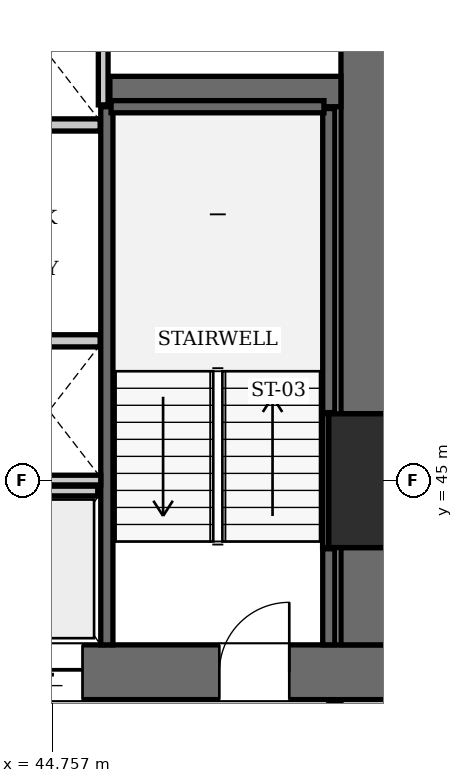
"""IFC4 building model, lengths in metres.
Left out: names, types, materials, properties, quantities, classifications, styles, units other than length and angle.
Written with IfcOpenShell. Run it as: python <this file> out.ifc"""

import sys

from ifc_helpers import new_model, si_unit, direction, frame, frame_2d, origin, origin_2d, place, context, subcontext, project, spatial, rectangle, extrude, element, fill, save


model = new_model("IFC4")
c1 = context("Model", 3, precision=1e-05, world=origin(), true_north=direction((0.0, 1.0)))
c2 = subcontext(c1, "Body", "Model", "MODEL_VIEW")
j1 = project(units=[si_unit("LENGTHUNIT", "METRE"), si_unit("PLANEANGLEUNIT", "RADIAN")], contexts=[c1])
p1 = place(None, origin())
s1 = spatial("IfcSite", under=j1, at=p1, CompositionType="ELEMENT")
p2 = place(p1, origin())
s2 = spatial("IfcBuilding", under=s1, at=p2, CompositionType="ELEMENT")
p3 = place(p2, frame((0.0, 0.0, 42.35)))
s3 = spatial("IfcBuildingStorey", under=s2, at=p3, CompositionType="ELEMENT", Elevation=42.35)
p4 = place(p3, frame((50.4, 45.0, 0.0), z_axis=(0.0, 0.0, 1.0), x_axis=(1.0, 0.0, 0.0)))
e1 = element("IfcColumn", 1, at=p4, inside=s3, PredefinedType="COLUMN", context=c2, shape_type="SweptSolid", body=[
    extrude(rectangle(XDim=2.2, YDim=2.2, at=origin_2d()), origin(), (0.0, 0.0, 1.0), 3.85),
])
p5 = place(p3, frame((43.6, 41.85, 0.0), z_axis=(0.0, 0.0, 1.0), x_axis=(1.0, 0.0, 0.0)))
e2 = element("IfcWall", 2, at=p5, inside=s3, PredefinedType="SHEAR", context=c2, shape_type="SweptSolid", body=[
    extrude(rectangle(XDim=6.8, YDim=0.9, at=frame_2d((3.4, 0.0))), origin(), (0.0, 0.0, 1.0), 3.85),
])
p6 = place(p5, frame((3.9, 0.0, 0.0)))
e3 = element("IfcOpeningElement", 3, at=p6, cuts=e2, PredefinedType="OPENING", context=c2, shape_type="SweptSolid", body=[
    extrude(rectangle(XDim=1.15, YDim=2.15, at=frame_2d((0.575, 1.075))), frame((0.0, 0.46, 0.0), z_axis=(0.0, -1.0, 0.0), x_axis=(1.0, 0.0, 0.0)), (0.0, 0.0, 1.0), 0.92),
])
p7 = place(p5, frame((0.55, 0.0, 0.0)))
e4 = element("IfcOpeningElement", 4, at=p7, cuts=e2, PredefinedType="OPENING", context=c2, shape_type="SweptSolid", body=[
    extrude(rectangle(XDim=1.1, YDim=2.2, at=frame_2d((0.55, 1.1))), frame((0.0, 0.46, 0.0), z_axis=(0.0, -1.0, 0.0), x_axis=(1.0, 0.0, 0.0)), (0.0, 0.0, 1.0), 0.92),
])
p8 = place(p3, frame((49.95, 42.3, 0.0), z_axis=(0.0, 0.0, 1.0), x_axis=(0.0, 1.0, 0.0)))
e5 = element("IfcWall", 5, at=p8, inside=s3, PredefinedType="SHEAR", context=c2, shape_type="SweptSolid", body=[
    extrude(rectangle(XDim=1.6, YDim=0.9, at=frame_2d((0.8, 0.0))), origin(), (0.0, 0.0, 1.0), 3.85),
])
p9 = place(p3, frame((49.95, 46.1, 0.0), z_axis=(0.0, 0.0, 1.0), x_axis=(0.0, 1.0, 0.0)))
e6 = element("IfcWall", 6, at=p9, inside=s3, PredefinedType="SHEAR", context=c2, shape_type="SweptSolid", body=[
    extrude(rectangle(XDim=7.0, YDim=0.9, at=frame_2d((3.5, 0.0))), origin(), (0.0, 0.0, 1.0), 3.85),
])
p10 = place(p3, frame((45.7, 51.4, 0.0), z_axis=(0.0, 0.0, 1.0), x_axis=(1.0, 0.0, 0.0)))
e7 = element("IfcWall", 7, at=p10, inside=s3, PredefinedType="SHEAR", context=c2, shape_type="SweptSolid", body=[
    extrude(rectangle(XDim=3.8, YDim=0.5, at=frame_2d((1.9, 0.0))), origin(), (0.0, 0.0, 1.0), 3.85),
])
p11 = place(p3, frame((45.65, 42.3, 0.0), z_axis=(0.0, 0.0, 1.0), x_axis=(0.0, 1.0, 0.0)))
e8 = element("IfcWall", 8, at=p11, inside=s3, PredefinedType="SOLIDWALL", context=c2, shape_type="SweptSolid", body=[
    extrude(rectangle(XDim=8.85, YDim=0.2, at=frame_2d((4.425, 0.0))), origin(), (0.0, 0.0, 1.0), 3.61),
])
p12 = place(p3, frame((49.3, 42.3, 0.0), z_axis=(0.0, 0.0, 1.0), x_axis=(0.0, 1.0, 0.0)))
e9 = element("IfcWall", 9, at=p12, inside=s3, PredefinedType="SOLIDWALL", context=c2, shape_type="SweptSolid", body=[
    extrude(rectangle(XDim=1.58, YDim=0.2, at=frame_2d((0.79, 0.0))), origin(), (0.0, 0.0, 1.0), 3.61),
])
p13 = place(p3, frame((49.3, 46.12, 0.0), z_axis=(0.0, 0.0, 1.0), x_axis=(0.0, 1.0, 0.0)))
e10 = element("IfcWall", 10, at=p13, inside=s3, PredefinedType="SOLIDWALL", context=c2, shape_type="SweptSolid", body=[
    extrude(rectangle(XDim=5.0, YDim=0.2, at=frame_2d((2.5, 0.0))), origin(), (0.0, 0.0, 1.0), 3.61),
])
p14 = place(p3, frame((45.72, 51.15, 0.0), z_axis=(0.0, 0.0, 1.0), x_axis=(1.0, 0.0, 0.0)))
e11 = element("IfcWall", 11, at=p14, inside=s3, PredefinedType="SOLIDWALL", context=c2, shape_type="SweptSolid", body=[
    extrude(rectangle(XDim=3.5, YDim=0.2, at=frame_2d((1.75, 0.0))), origin(), (0.0, 0.0, 1.0), 3.61),
])
p15 = place(p3, frame((49.248, 43.9, 0.0), z_axis=(0.0, 0.0, 1.0), x_axis=(0.0, 1.0, 0.0)))
e12 = element("IfcWall", 12, at=p15, inside=s3, PredefinedType="SOLIDWALL", context=c2, shape_type="SweptSolid", body=[
    extrude(rectangle(XDim=2.2, YDim=0.1, at=frame_2d((1.1, 0.0))), origin(), (0.0, 0.0, 1.0), 3.61),
])
for number, where, z_axis, x_axis in (
    (13, (43.86, 47.3, 0.0), (0.0, 0.0, 1.0), (1.0, 0.0, 0.0)),
    (14, (43.86, 50.85, 0.0), (0.0, 0.0, 1.0), (1.0, 0.0, 0.0)),
):
    element("IfcWall", number, at=place(p3, frame(where, z_axis=z_axis, x_axis=x_axis)), inside=s3, PredefinedType="SOLIDWALL", context=c2, shape_type="SweptSolid", body=[
        extrude(rectangle(XDim=1.68, YDim=0.2, at=frame_2d((0.84, 0.0))), origin(), (0.0, 0.0, 1.0), 3.61),
    ])
p16 = place(p3, frame((43.9, 44.83, 0.0), z_axis=(0.0, 0.0, 1.0), x_axis=(1.0, 0.0, 0.0)))
e15 = element("IfcWall", 15, at=p16, inside=s3, PredefinedType="SOLIDWALL", context=c2, shape_type="SweptSolid", body=[
    extrude(rectangle(XDim=1.6, YDim=0.16, at=frame_2d((0.8, 0.0))), origin(), (0.0, 0.0, 1.0), 3.61),
])
p17 = place(p3, frame((42.1, 45.01, 0.0), z_axis=(0.0, 0.0, 1.0), x_axis=(1.0, 0.0, 0.0)))
e16 = element("IfcWall", 16, at=p17, inside=s3, PredefinedType="SOLIDWALL", context=c2, shape_type="SweptSolid", body=[
    extrude(rectangle(XDim=3.45, YDim=0.16, at=frame_2d((1.725, 0.0))), origin(), (0.0, 0.0, 1.0), 3.61),
])
p18 = place(p3, frame((45.59, 51.18, 0.0), z_axis=(0.0, 0.0, 1.0), x_axis=(0.0, 1.0, 0.0)))
e17 = element("IfcWall", 17, at=p18, inside=s3, PredefinedType="SOLIDWALL", context=c2, shape_type="SweptSolid", body=[
    extrude(rectangle(XDim=1.92, YDim=0.16, at=frame_2d((0.96, 0.0))), origin(), (0.0, 0.0, 1.0), 3.61),
])
p19 = place(p3, frame((49.4, 38.31, 0.0), z_axis=(0.0, 0.0, 1.0), x_axis=(0.0, 1.0, 0.0)))
e18 = element("IfcWall", 18, at=p19, inside=s3, PredefinedType="PARTITIONING", context=c2, shape_type="SweptSolid", body=[
    extrude(rectangle(XDim=3.07, YDim=0.2, at=frame_2d((1.535, 0.0))), origin(), (0.0, 0.0, 1.0), 3.61),
])
p20 = place(p6, origin())
e19 = element("IfcDoor", 19, at=p20, inside=s3, OperationType="SINGLE_SWING_RIGHT", PredefinedType="DOOR", context=c2, shape_type="SweptSolid", body=[
    extrude(rectangle(XDim=1.15, YDim=2.15, at=frame_2d((0.575, 1.075))), frame((0.0, 0.025, 0.0), z_axis=(0.0, -1.0, 0.0), x_axis=(1.0, 0.0, 0.0)), (0.0, 0.0, 1.0), 0.05),
])
fill(e3, e19)
p21 = place(p7, frame((1.1, 0.0, 0.0), z_axis=(0.0, 0.0, 1.0), x_axis=(-1.0, 0.0, 0.0)))
e20 = element("IfcDoor", 20, at=p21, inside=s3, OperationType="SLIDING_TO_LEFT", PredefinedType="DOOR", context=c2, shape_type="SweptSolid", body=[
    extrude(rectangle(XDim=1.1, YDim=2.2, at=frame_2d((0.55, 1.1))), frame((0.0, 0.025, 0.0), z_axis=(0.0, -1.0, 0.0), x_axis=(1.0, 0.0, 0.0)), (0.0, 0.0, 1.0), 0.05),
])
fill(e4, e20)
save(model, sys.argv[1])
